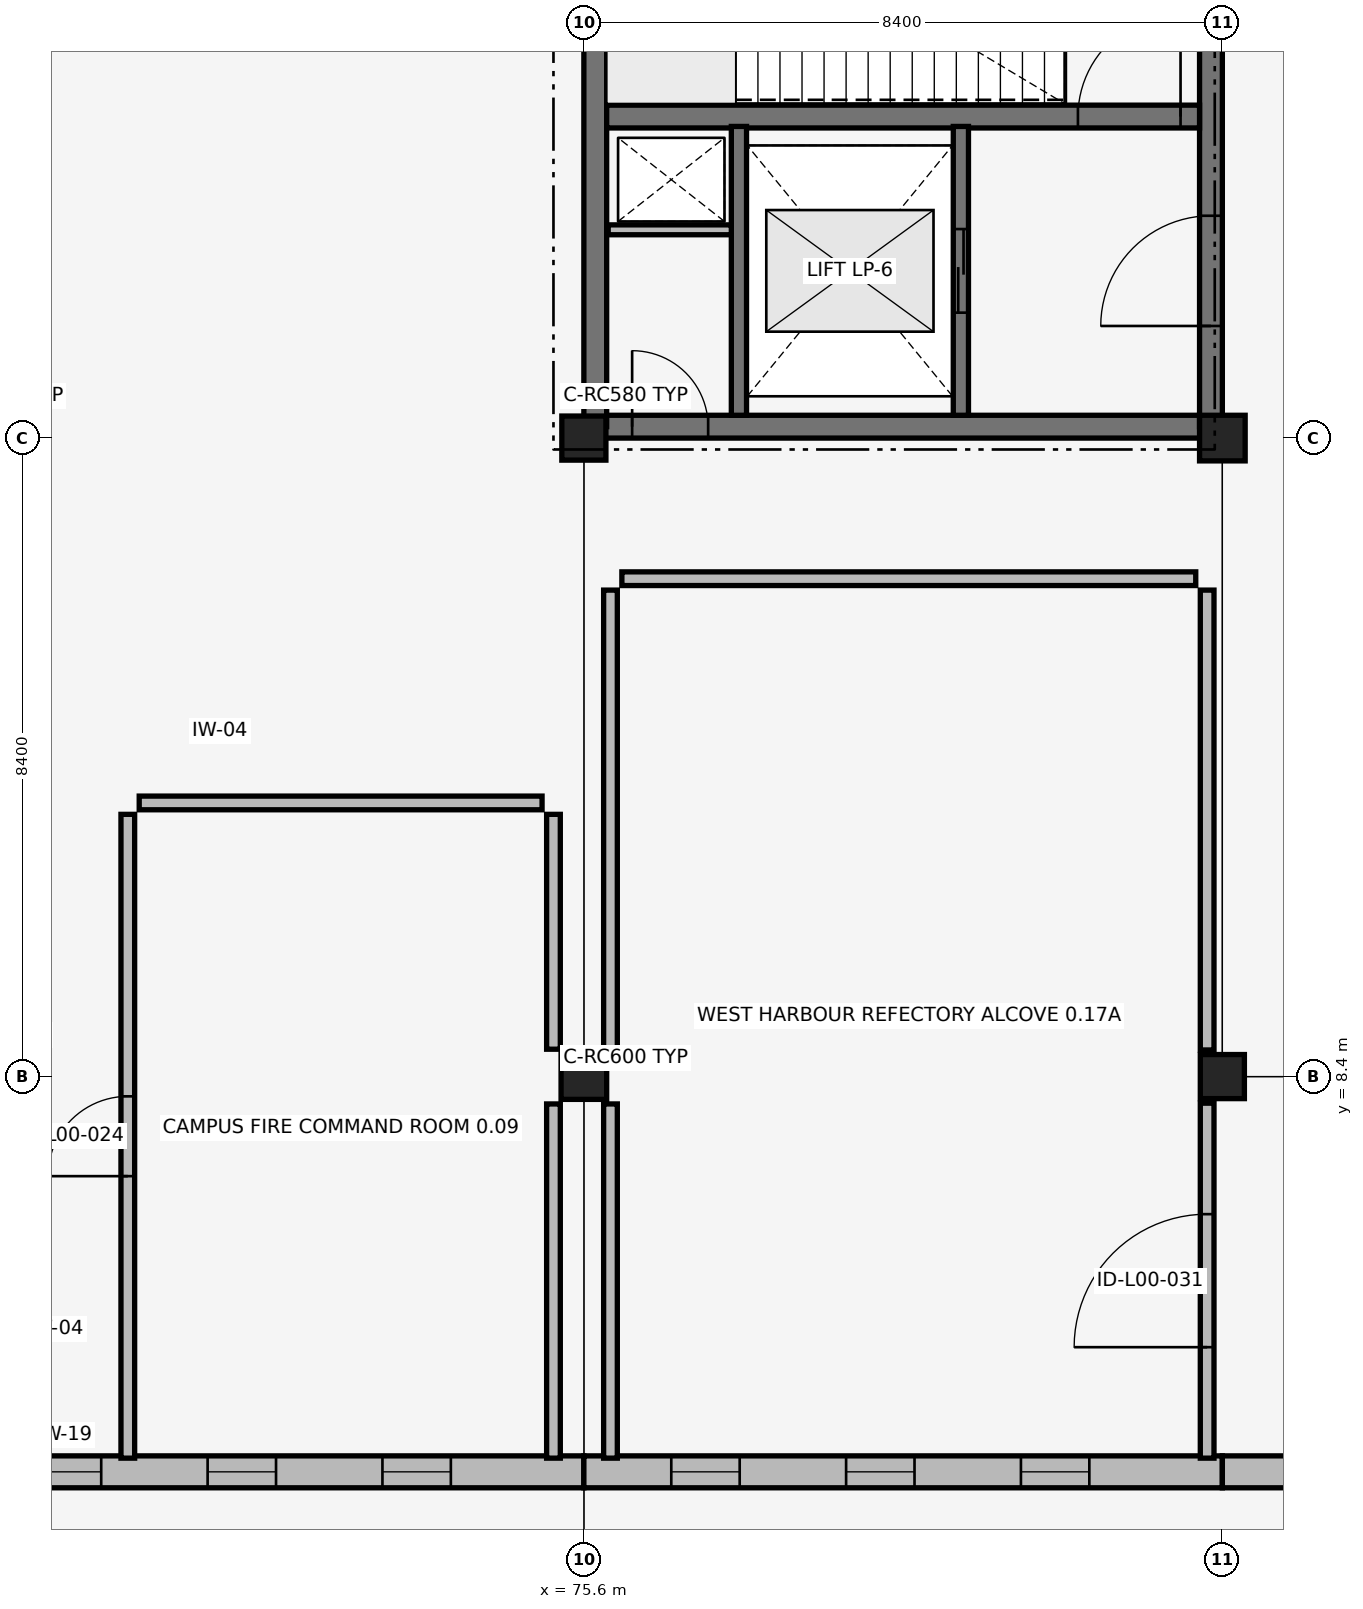
"""IFC4 building model, lengths in metres.
Left out: names, types, materials, properties, quantities, classifications, styles, units other than length and angle.
Written with IfcOpenShell. Run it as: python <this file> out.ifc"""

import sys

from ifc_helpers import new_model, si_unit, direction, frame, frame_2d, origin, origin_2d, place, context, subcontext, project, spatial, rectangle, extrude, element, fill, save


model = new_model("IFC4")
c1 = context("Model", 3, precision=1e-05, world=origin(), true_north=direction((0.0, 1.0)))
c2 = subcontext(c1, "Body", "Model", "MODEL_VIEW")
j1 = project(units=[si_unit("LENGTHUNIT", "METRE"), si_unit("PLANEANGLEUNIT", "RADIAN")], contexts=[c1])
p1 = place(None, origin())
s1 = spatial("IfcSite", under=j1, at=p1, CompositionType="ELEMENT")
p2 = place(p1, origin())
s2 = spatial("IfcBuilding", under=s1, at=p2, CompositionType="ELEMENT")
p3 = place(p2, origin())
s3 = spatial("IfcBuildingStorey", under=s2, at=p3, CompositionType="ELEMENT", Elevation=0.0)
p4 = place(p3, frame((75.75, 16.95, 0.0), z_axis=(0.0, 0.0, 1.0), x_axis=(1.0, 0.0, 0.0)))
e1 = element("IfcWall", 1, at=p4, inside=s3, PredefinedType="SHEAR", context=c2, shape_type="SweptSolid", body=[
    extrude(rectangle(XDim=8.1, YDim=0.3, at=frame_2d((4.05, 0.0))), origin(), (0.0, 0.0, 1.0), 5.14),
])
p5 = place(p4, frame((0.485, 0.0, 0.0)))
e2 = element("IfcOpeningElement", 2, at=p5, cuts=e1, PredefinedType="OPENING", context=c2, shape_type="SweptSolid", body=[
    extrude(rectangle(XDim=1.0, YDim=2.15, at=frame_2d((0.5, 1.075))), frame((0.0, 0.16, 0.0), z_axis=(0.0, -1.0, 0.0), x_axis=(1.0, 0.0, 0.0)), (0.0, 0.0, 1.0), 0.32),
])
p6 = place(p3, frame((75.75, 16.95, 0.0), z_axis=(0.0, 0.0, 1.0), x_axis=(0.0, 1.0, 0.0)))
e3 = element("IfcWall", 3, at=p6, inside=s3, PredefinedType="SHEAR", context=c2, shape_type="SweptSolid", body=[
    extrude(rectangle(XDim=8.1, YDim=0.3, at=frame_2d((4.05, 0.0))), origin(), (0.0, 0.0, 1.0), 5.14),
])
p7 = place(p3, frame((83.85, 16.95, 0.0), z_axis=(0.0, 0.0, 1.0), x_axis=(0.0, 1.0, 0.0)))
e4 = element("IfcWall", 4, at=p7, inside=s3, PredefinedType="SHEAR", context=c2, shape_type="SweptSolid", body=[
    extrude(rectangle(XDim=8.1, YDim=0.3, at=frame_2d((4.05, 0.0))), origin(), (0.0, 0.0, 1.0), 5.14),
])
p8 = place(p7, frame((1.325, 0.0, 0.0)))
e5 = element("IfcOpeningElement", 5, at=p8, cuts=e4, PredefinedType="OPENING", context=c2, shape_type="SweptSolid", body=[
    extrude(rectangle(XDim=1.45, YDim=2.15, at=frame_2d((0.725, 1.075))), frame((0.0, 0.16, 0.0), z_axis=(0.0, -1.0, 0.0), x_axis=(1.0, 0.0, 0.0)), (0.0, 0.0, 1.0), 0.32),
])
p9 = place(p3, frame((75.9, 21.03, 0.0), z_axis=(0.0, 0.0, 1.0), x_axis=(1.0, 0.0, 0.0)))
e6 = element("IfcWall", 6, at=p9, inside=s3, PredefinedType="SHEAR", context=c2, shape_type="SweptSolid", body=[
    extrude(rectangle(XDim=7.8, YDim=0.3, at=frame_2d((3.9, 0.0))), origin(), (0.0, 0.0, 1.0), 5.14),
])
p10 = place(p9, frame((6.2, 0.0, 0.0)))
e7 = element("IfcOpeningElement", 7, at=p10, cuts=e6, PredefinedType="OPENING", context=c2, shape_type="SweptSolid", body=[
    extrude(rectangle(XDim=1.35, YDim=2.15, at=frame_2d((0.675, 1.075))), frame((0.0, 0.16, 0.0), z_axis=(0.0, -1.0, 0.0), x_axis=(1.0, 0.0, 0.0)), (0.0, 0.0, 1.0), 0.32),
])
p11 = place(p3, frame((75.6, 8.4, 0.0), z_axis=(0.0, 0.0, 1.0), x_axis=(1.0, 0.0, 0.0)))
e8 = element("IfcColumn", 8, at=p11, inside=s3, PredefinedType="COLUMN", context=c2, shape_type="SweptSolid", body=[
    extrude(rectangle(XDim=0.6, YDim=0.6, at=origin_2d()), origin(), (0.0, 0.0, 1.0), 5.14),
])
for number, where, z_axis, x_axis in (
    (9, (75.6, 16.8, 0.0), (0.0, 0.0, 1.0), (1.0, 0.0, 0.0)),
    (10, (84.0, 8.4, 0.0), (0.0, 0.0, 1.0), (1.0, 0.0, 0.0)),
):
    element("IfcColumn", number, at=place(p3, frame(where, z_axis=z_axis, x_axis=x_axis)), inside=s3, PredefinedType="COLUMN", context=c2, shape_type="SweptSolid", body=[
        extrude(rectangle(XDim=0.58, YDim=0.58, at=origin_2d()), origin(), (0.0, 0.0, 1.0), 5.14),
    ])
p12 = place(p3, frame((84.0, 16.8, 0.0), z_axis=(0.0, 0.0, 1.0), x_axis=(1.0, 0.0, 0.0)))
e11 = element("IfcColumn", 11, at=p12, inside=s3, PredefinedType="COLUMN", context=c2, shape_type="SweptSolid", body=[
    extrude(rectangle(XDim=0.6, YDim=0.6, at=origin_2d()), origin(), (0.0, 0.0, 1.0), 5.14),
])
p13 = place(p3, frame((67.2, 3.2, 0.0), z_axis=(0.0, 0.0, 1.0), x_axis=(1.0, 0.0, 0.0)))
e12 = element("IfcWall", 12, at=p13, inside=s3, PredefinedType="SOLIDWALL", context=c2, shape_type="SweptSolid", body=[
    extrude(rectangle(XDim=8.4, YDim=0.42, at=frame_2d((4.2, 0.0))), origin(), (0.0, 0.0, 1.0), 4.83),
])
p14 = place(p13, frame((1.15, 0.0, 0.85)))
e13 = element("IfcOpeningElement", 13, at=p14, cuts=e12, PredefinedType="OPENING", context=c2, shape_type="SweptSolid", body=[
    extrude(rectangle(XDim=0.9, YDim=3.0, at=frame_2d((0.45, 1.5))), frame((0.0, 0.22, 0.0), z_axis=(0.0, -1.0, 0.0), x_axis=(1.0, 0.0, 0.0)), (0.0, 0.0, 1.0), 0.44),
])
p15 = place(p13, frame((3.45, 0.0, 0.85)))
e14 = element("IfcOpeningElement", 14, at=p15, cuts=e12, PredefinedType="OPENING", context=c2, shape_type="SweptSolid", body=[
    extrude(rectangle(XDim=0.9, YDim=3.0, at=frame_2d((0.45, 1.5))), frame((0.0, 0.22, 0.0), z_axis=(0.0, -1.0, 0.0), x_axis=(1.0, 0.0, 0.0)), (0.0, 0.0, 1.0), 0.44),
])
p16 = place(p13, frame((5.75, 0.0, 0.85)))
e15 = element("IfcOpeningElement", 15, at=p16, cuts=e12, PredefinedType="OPENING", context=c2, shape_type="SweptSolid", body=[
    extrude(rectangle(XDim=0.9, YDim=3.0, at=frame_2d((0.45, 1.5))), frame((0.0, 0.22, 0.0), z_axis=(0.0, -1.0, 0.0), x_axis=(1.0, 0.0, 0.0)), (0.0, 0.0, 1.0), 0.44),
])
p17 = place(p3, frame((75.6, 3.2, 0.0), z_axis=(0.0, 0.0, 1.0), x_axis=(1.0, 0.0, 0.0)))
e16 = element("IfcWall", 16, at=p17, inside=s3, PredefinedType="SOLIDWALL", context=c2, shape_type="SweptSolid", body=[
    extrude(rectangle(XDim=8.4, YDim=0.42, at=frame_2d((4.2, 0.0))), origin(), (0.0, 0.0, 1.0), 4.49),
])
p18 = place(p17, frame((1.15, 0.0, 0.85)))
e17 = element("IfcOpeningElement", 17, at=p18, cuts=e16, PredefinedType="OPENING", context=c2, shape_type="SweptSolid", body=[
    extrude(rectangle(XDim=0.9, YDim=3.0, at=frame_2d((0.45, 1.5))), frame((0.0, 0.22, 0.0), z_axis=(0.0, -1.0, 0.0), x_axis=(1.0, 0.0, 0.0)), (0.0, 0.0, 1.0), 0.44),
])
p19 = place(p17, frame((3.45, 0.0, 0.85)))
e18 = element("IfcOpeningElement", 18, at=p19, cuts=e16, PredefinedType="OPENING", context=c2, shape_type="SweptSolid", body=[
    extrude(rectangle(XDim=0.9, YDim=3.0, at=frame_2d((0.45, 1.5))), frame((0.0, 0.22, 0.0), z_axis=(0.0, -1.0, 0.0), x_axis=(1.0, 0.0, 0.0)), (0.0, 0.0, 1.0), 0.44),
])
p20 = place(p17, frame((5.75, 0.0, 0.85)))
e19 = element("IfcOpeningElement", 19, at=p20, cuts=e16, PredefinedType="OPENING", context=c2, shape_type="SweptSolid", body=[
    extrude(rectangle(XDim=0.9, YDim=3.0, at=frame_2d((0.45, 1.5))), frame((0.0, 0.22, 0.0), z_axis=(0.0, -1.0, 0.0), x_axis=(1.0, 0.0, 0.0)), (0.0, 0.0, 1.0), 0.44),
])
p21 = place(p3, frame((84.0, 3.2, 0.0), z_axis=(0.0, 0.0, 1.0), x_axis=(1.0, 0.0, 0.0)))
e20 = element("IfcWall", 20, at=p21, inside=s3, PredefinedType="SOLIDWALL", context=c2, shape_type="SweptSolid", body=[
    extrude(rectangle(XDim=8.4, YDim=0.42, at=frame_2d((4.2, 0.0))), origin(), (0.0, 0.0, 1.0), 4.49),
])
p22 = place(p21, frame((3.1, 0.0, 0.0)))
e21 = element("IfcOpeningElement", 21, at=p22, cuts=e20, PredefinedType="OPENING", context=c2, shape_type="SweptSolid", body=[
    extrude(rectangle(XDim=2.2, YDim=2.4, at=frame_2d((1.1, 1.2))), frame((0.0, 0.22, 0.0), z_axis=(0.0, -1.0, 0.0), x_axis=(1.0, 0.0, 0.0)), (0.0, 0.0, 1.0), 0.44),
])
p23 = place(p3, frame((80.56, 17.1, 0.0), z_axis=(0.0, 0.0, 1.0), x_axis=(0.0, 1.0, 0.0)))
e22 = element("IfcWall", 22, at=p23, inside=s3, PredefinedType="SHEAR", context=c2, shape_type="SweptSolid", body=[
    extrude(rectangle(XDim=3.8, YDim=0.2, at=frame_2d((1.9, 0.0))), origin(), (0.0, 0.0, 1.0), 4.36),
])
p24 = place(p23, frame((1.35, 0.0, 0.0)))
e23 = element("IfcOpeningElement", 23, at=p24, cuts=e22, PredefinedType="OPENING", context=c2, shape_type="SweptSolid", body=[
    extrude(rectangle(XDim=1.1, YDim=2.15, at=frame_2d((0.55, 1.075))), frame((0.0, 0.11, 0.0), z_axis=(0.0, -1.0, 0.0), x_axis=(1.0, 0.0, 0.0)), (0.0, 0.0, 1.0), 0.22),
])
p25 = place(p3, frame((77.64, 17.1, 0.0), z_axis=(0.0, 0.0, 1.0), x_axis=(0.0, 1.0, 0.0)))
e24 = element("IfcWall", 24, at=p25, inside=s3, PredefinedType="SHEAR", context=c2, shape_type="SweptSolid", body=[
    extrude(rectangle(XDim=3.8, YDim=0.2, at=frame_2d((1.9, 0.0))), origin(), (0.0, 0.0, 1.0), 4.36),
])
p26 = place(p3, frame((75.92, 19.54, 0.0), z_axis=(0.0, 0.0, 1.0), x_axis=(1.0, 0.0, 0.0)))
e25 = element("IfcWall", 25, at=p26, inside=s3, PredefinedType="PARTITIONING", context=c2, shape_type="SweptSolid", body=[
    extrude(rectangle(XDim=1.62, YDim=0.13, at=frame_2d((0.81, 0.0))), origin(), (0.0, 0.0, 1.0), 5.14),
])
p27 = place(p3, frame((69.6, 3.38, 0.0), z_axis=(0.0, 0.0, 1.0), x_axis=(0.0, 1.0, 0.0)))
e26 = element("IfcWall", 26, at=p27, inside=s3, PredefinedType="PARTITIONING", context=c2, shape_type="SweptSolid", body=[
    extrude(rectangle(XDim=8.47, YDim=0.18, at=frame_2d((4.235, 0.0))), origin(), (0.0, 0.0, 1.0), 4.39),
])
p28 = place(p27, frame((3.71, 0.0, 0.0)))
e27 = element("IfcOpeningElement", 27, at=p28, cuts=e26, PredefinedType="OPENING", context=c2, shape_type="SweptSolid", body=[
    extrude(rectangle(XDim=1.05, YDim=2.15, at=frame_2d((0.525, 1.075))), frame((0.0, 0.1, 0.0), z_axis=(0.0, -1.0, 0.0), x_axis=(1.0, 0.0, 0.0)), (0.0, 0.0, 1.0), 0.2),
])
p29 = place(p3, frame((69.75, 12.0, 0.0), z_axis=(0.0, 0.0, 1.0), x_axis=(1.0, 0.0, 0.0)))
e28 = element("IfcWall", 28, at=p29, inside=s3, PredefinedType="PARTITIONING", context=c2, shape_type="SweptSolid", body=[
    extrude(rectangle(XDim=5.3, YDim=0.18, at=frame_2d((2.65, 0.0))), origin(), (0.0, 0.0, 1.0), 5.14),
])
p30 = place(p3, frame((75.2, 3.38, 0.0), z_axis=(0.0, 0.0, 1.0), x_axis=(0.0, 1.0, 0.0)))
e29 = element("IfcWall", 29, at=p30, inside=s3, PredefinedType="PARTITIONING", context=c2, shape_type="SweptSolid", body=[
    extrude(rectangle(XDim=4.66, YDim=0.18, at=frame_2d((2.33, 0.0))), origin(), (0.0, 0.0, 1.0), 5.14),
])
p31 = place(p3, frame((75.2, 8.76, 0.0), z_axis=(0.0, 0.0, 1.0), x_axis=(0.0, 1.0, 0.0)))
e30 = element("IfcWall", 30, at=p31, inside=s3, PredefinedType="PARTITIONING", context=c2, shape_type="SweptSolid", body=[
    extrude(rectangle(XDim=3.09, YDim=0.18, at=frame_2d((1.545, 0.0))), origin(), (0.0, 0.0, 1.0), 5.14),
])
p32 = place(p3, frame((83.8, 3.38, 0.0), z_axis=(0.0, 0.0, 1.0), x_axis=(0.0, 1.0, 0.0)))
e31 = element("IfcWall", 31, at=p32, inside=s3, PredefinedType="PARTITIONING", context=c2, shape_type="SweptSolid", body=[
    extrude(rectangle(XDim=4.67, YDim=0.18, at=frame_2d((2.335, 0.0))), origin(), (0.0, 0.0, 1.0), 4.49),
])
p33 = place(p32, frame((1.46, 0.0, 0.0)))
e32 = element("IfcOpeningElement", 32, at=p33, cuts=e31, PredefinedType="OPENING", context=c2, shape_type="SweptSolid", body=[
    extrude(rectangle(XDim=1.75, YDim=2.3, at=frame_2d((0.875, 1.15))), frame((0.0, 0.1, 0.0), z_axis=(0.0, -1.0, 0.0), x_axis=(1.0, 0.0, 0.0)), (0.0, 0.0, 1.0), 0.2),
])
p34 = place(p3, frame((83.8, 8.75, 0.0), z_axis=(0.0, 0.0, 1.0), x_axis=(0.0, 1.0, 0.0)))
e33 = element("IfcWall", 33, at=p34, inside=s3, PredefinedType="PARTITIONING", context=c2, shape_type="SweptSolid", body=[
    extrude(rectangle(XDim=6.05, YDim=0.18, at=frame_2d((3.025, 0.0))), origin(), (0.0, 0.0, 1.0), 4.49),
])
p35 = place(p3, frame((76.1, 14.95, 0.0), z_axis=(0.0, 0.0, 1.0), x_axis=(1.0, 0.0, 0.0)))
e34 = element("IfcWall", 34, at=p35, inside=s3, PredefinedType="PARTITIONING", context=c2, shape_type="SweptSolid", body=[
    extrude(rectangle(XDim=7.55, YDim=0.18, at=frame_2d((3.775, 0.0))), origin(), (0.0, 0.0, 1.0), 5.14),
])
p36 = place(p3, frame((75.95, 3.38, 0.0), z_axis=(0.0, 0.0, 1.0), x_axis=(0.0, 1.0, 0.0)))
e35 = element("IfcWall", 35, at=p36, inside=s3, PredefinedType="PARTITIONING", context=c2, shape_type="SweptSolid", body=[
    extrude(rectangle(XDim=4.66, YDim=0.18, at=frame_2d((2.33, 0.0))), origin(), (0.0, 0.0, 1.0), 4.58),
])
p37 = place(p3, frame((75.95, 8.76, 0.0), z_axis=(0.0, 0.0, 1.0), x_axis=(0.0, 1.0, 0.0)))
e36 = element("IfcWall", 36, at=p37, inside=s3, PredefinedType="PARTITIONING", context=c2, shape_type="SweptSolid", body=[
    extrude(rectangle(XDim=6.04, YDim=0.18, at=frame_2d((3.02, 0.0))), origin(), (0.0, 0.0, 1.0), 4.59),
])
p38 = place(p14, origin())
e37 = element("IfcWindow", 37, at=p38, inside=s3, PartitioningType="DOUBLE_PANEL_VERTICAL", PredefinedType="WINDOW", context=c2, shape_type="SweptSolid", body=[
    extrude(rectangle(XDim=0.9, YDim=3.0, at=frame_2d((0.45, 1.5))), frame((0.0, 0.03, 0.0), z_axis=(0.0, -1.0, 0.0), x_axis=(1.0, 0.0, 0.0)), (0.0, 0.0, 1.0), 0.06),
])
fill(e13, e37)
p39 = place(p15, origin())
e38 = element("IfcWindow", 38, at=p39, inside=s3, PartitioningType="DOUBLE_PANEL_VERTICAL", PredefinedType="WINDOW", context=c2, shape_type="SweptSolid", body=[
    extrude(rectangle(XDim=0.9, YDim=3.0, at=frame_2d((0.45, 1.5))), frame((0.0, 0.03, 0.0), z_axis=(0.0, -1.0, 0.0), x_axis=(1.0, 0.0, 0.0)), (0.0, 0.0, 1.0), 0.06),
])
fill(e14, e38)
p40 = place(p16, origin())
e39 = element("IfcWindow", 39, at=p40, inside=s3, PartitioningType="DOUBLE_PANEL_VERTICAL", PredefinedType="WINDOW", context=c2, shape_type="SweptSolid", body=[
    extrude(rectangle(XDim=0.9, YDim=3.0, at=frame_2d((0.45, 1.5))), frame((0.0, 0.03, 0.0), z_axis=(0.0, -1.0, 0.0), x_axis=(1.0, 0.0, 0.0)), (0.0, 0.0, 1.0), 0.06),
])
fill(e15, e39)
p41 = place(p18, origin())
e40 = element("IfcWindow", 40, at=p41, inside=s3, PartitioningType="DOUBLE_PANEL_VERTICAL", PredefinedType="WINDOW", context=c2, shape_type="SweptSolid", body=[
    extrude(rectangle(XDim=0.9, YDim=3.0, at=frame_2d((0.45, 1.5))), frame((0.0, 0.03, 0.0), z_axis=(0.0, -1.0, 0.0), x_axis=(1.0, 0.0, 0.0)), (0.0, 0.0, 1.0), 0.06),
])
fill(e17, e40)
p42 = place(p19, origin())
e41 = element("IfcWindow", 41, at=p42, inside=s3, PartitioningType="DOUBLE_PANEL_VERTICAL", PredefinedType="WINDOW", context=c2, shape_type="SweptSolid", body=[
    extrude(rectangle(XDim=0.9, YDim=3.0, at=frame_2d((0.45, 1.5))), frame((0.0, 0.03, 0.0), z_axis=(0.0, -1.0, 0.0), x_axis=(1.0, 0.0, 0.0)), (0.0, 0.0, 1.0), 0.06),
])
fill(e18, e41)
p43 = place(p20, origin())
e42 = element("IfcWindow", 42, at=p43, inside=s3, PartitioningType="DOUBLE_PANEL_VERTICAL", PredefinedType="WINDOW", context=c2, shape_type="SweptSolid", body=[
    extrude(rectangle(XDim=0.9, YDim=3.0, at=frame_2d((0.45, 1.5))), frame((0.0, 0.03, 0.0), z_axis=(0.0, -1.0, 0.0), x_axis=(1.0, 0.0, 0.0)), (0.0, 0.0, 1.0), 0.06),
])
fill(e19, e42)
p44 = place(p10, origin())
e43 = element("IfcDoor", 43, at=p44, inside=s3, OperationType="SINGLE_SWING_RIGHT", PredefinedType="DOOR", context=c2, shape_type="SweptSolid", body=[
    extrude(rectangle(XDim=1.35, YDim=2.15, at=frame_2d((0.675, 1.075))), frame((0.0, 0.025, 0.0), z_axis=(0.0, -1.0, 0.0), x_axis=(1.0, 0.0, 0.0)), (0.0, 0.0, 1.0), 0.05),
])
fill(e7, e43)
p45 = place(p24, origin())
e44 = element("IfcDoor", 44, at=p45, inside=s3, OperationType="SLIDING_TO_LEFT", PredefinedType="DOOR", context=c2, shape_type="SweptSolid", body=[
    extrude(rectangle(XDim=1.1, YDim=2.15, at=frame_2d((0.55, 1.075))), frame((0.0, 0.025, 0.0), z_axis=(0.0, -1.0, 0.0), x_axis=(1.0, 0.0, 0.0)), (0.0, 0.0, 1.0), 0.05),
])
fill(e23, e44)
p46 = place(p8, origin())
e45 = element("IfcDoor", 45, at=p46, inside=s3, OperationType="DOUBLE_DOOR_SINGLE_SWING", PredefinedType="DOOR", context=c2, shape_type="SweptSolid", body=[
    extrude(rectangle(XDim=1.45, YDim=2.15, at=frame_2d((0.725, 1.075))), frame((0.0, 0.025, 0.0), z_axis=(0.0, -1.0, 0.0), x_axis=(1.0, 0.0, 0.0)), (0.0, 0.0, 1.0), 0.05),
])
fill(e5, e45)
p47 = place(p5, origin())
e46 = element("IfcDoor", 46, at=p47, inside=s3, OperationType="SINGLE_SWING_LEFT", PredefinedType="DOOR", context=c2, shape_type="SweptSolid", body=[
    extrude(rectangle(XDim=1.0, YDim=2.15, at=frame_2d((0.5, 1.075))), frame((0.0, 0.025, 0.0), z_axis=(0.0, -1.0, 0.0), x_axis=(1.0, 0.0, 0.0)), (0.0, 0.0, 1.0), 0.05),
])
fill(e2, e46)
p48 = place(p28, origin())
e47 = element("IfcDoor", 47, at=p48, inside=s3, OperationType="SINGLE_SWING_LEFT", PredefinedType="DOOR", context=c2, shape_type="SweptSolid", body=[
    extrude(rectangle(XDim=1.05, YDim=2.15, at=frame_2d((0.525, 1.075))), frame((0.0, 0.025, 0.0), z_axis=(0.0, -1.0, 0.0), x_axis=(1.0, 0.0, 0.0)), (0.0, 0.0, 1.0), 0.05),
])
fill(e27, e47)
p49 = place(p33, origin())
e48 = element("IfcDoor", 48, at=p49, inside=s3, OperationType="DOUBLE_DOOR_SINGLE_SWING", PredefinedType="DOOR", context=c2, shape_type="SweptSolid", body=[
    extrude(rectangle(XDim=1.75, YDim=2.3, at=frame_2d((0.875, 1.15))), frame((0.0, 0.025, 0.0), z_axis=(0.0, -1.0, 0.0), x_axis=(1.0, 0.0, 0.0)), (0.0, 0.0, 1.0), 0.05),
])
fill(e32, e48)
save(model, sys.argv[1])
